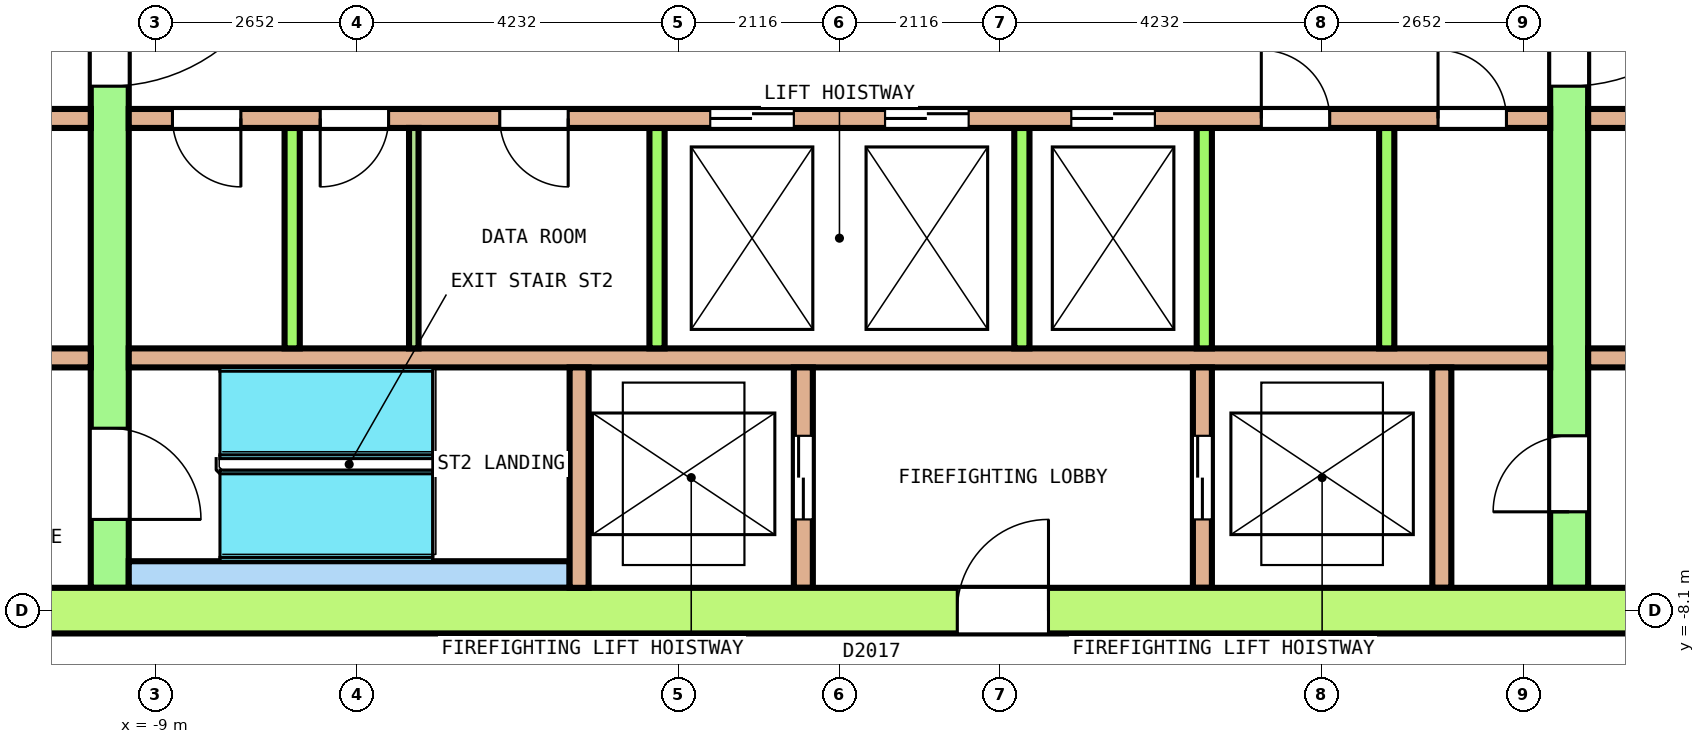
"""IFC4 building model, lengths in metres.
Left out: names, types, materials, properties, quantities, classifications, styles, units other than length and angle.
Written with IfcOpenShell. Run it as: python <this file> out.ifc"""

import sys

from ifc_helpers import new_model, si_unit, direction, frame, frame_2d, origin, place, context, subcontext, project, spatial, rectangle, extrude, element, fill, save


model = new_model("IFC4")
c1 = context("Model", 3, precision=1e-05, world=origin(), true_north=direction((0.0, 1.0)))
c2 = subcontext(c1, "Body", "Model", "MODEL_VIEW")
j1 = project(units=[si_unit("LENGTHUNIT", "METRE"), si_unit("PLANEANGLEUNIT", "RADIAN")], contexts=[c1])
p1 = place(None, origin())
s1 = spatial("IfcSite", under=j1, at=p1, CompositionType="ELEMENT")
p2 = place(p1, origin())
s2 = spatial("IfcBuilding", under=s1, at=p2, CompositionType="ELEMENT")
p3 = place(p2, frame((0.0, 0.0, 237.4)))
s3 = spatial("IfcBuildingStorey", under=s2, at=p3, CompositionType="ELEMENT", Elevation=237.4)
p4 = place(p3, frame((-13.5, -8.1, 0.0), z_axis=(0.0, 0.0, 1.0), x_axis=(1.0, 0.0, 0.0)))
e1 = element("IfcWall", 1, at=p4, inside=s3, PredefinedType="SHEAR", context=c2, shape_type="SweptSolid", body=[
    extrude(rectangle(XDim=27.0, YDim=0.6, at=frame_2d((13.5, 0.0))), origin(), (0.0, 0.0, 1.0), 3.7),
])
p5 = place(p4, frame((15.05, 0.0, 0.0)))
e2 = element("IfcOpeningElement", 2, at=p5, cuts=e1, PredefinedType="OPENING", context=c2, shape_type="SweptSolid", body=[
    extrude(rectangle(XDim=1.2, YDim=2.1, at=frame_2d((0.6, 1.05))), frame((0.0, 0.31, 0.0), z_axis=(0.0, -1.0, 0.0), x_axis=(1.0, 0.0, 0.0)), (0.0, 0.0, 1.0), 0.62),
])
p6 = place(p3, frame((-9.6, -7.8, 0.0), z_axis=(0.0, 0.0, 1.0), x_axis=(0.0, 1.0, 0.0)))
e3 = element("IfcWall", 3, at=p6, inside=s3, PredefinedType="SHEAR", context=c2, shape_type="SweptSolid", body=[
    extrude(rectangle(XDim=15.6, YDim=0.5, at=frame_2d((7.8, 0.0))), origin(), (0.0, 0.0, 1.0), 3.7),
])
p7 = place(p6, frame((6.6, 0.0, 0.0)))
e4 = element("IfcOpeningElement", 4, at=p7, cuts=e3, PredefinedType="OPENING", context=c2, shape_type="SweptSolid", body=[
    extrude(rectangle(XDim=2.4, YDim=2.1, at=frame_2d((1.2, 1.05))), frame((0.0, 0.26, 0.0), z_axis=(0.0, -1.0, 0.0), x_axis=(1.0, 0.0, 0.0)), (0.0, 0.0, 1.0), 0.52),
])
p8 = place(p6, frame((13.5, 0.0, 0.0)))
e5 = element("IfcOpeningElement", 5, at=p8, cuts=e3, PredefinedType="OPENING", context=c2, shape_type="SweptSolid", body=[
    extrude(rectangle(XDim=1.2, YDim=2.1, at=frame_2d((0.6, 1.05))), frame((0.0, 0.26, 0.0), z_axis=(0.0, -1.0, 0.0), x_axis=(1.0, 0.0, 0.0)), (0.0, 0.0, 1.0), 0.52),
])
p9 = place(p6, frame((0.9, 0.0, 0.0)))
e6 = element("IfcOpeningElement", 6, at=p9, cuts=e3, PredefinedType="OPENING", context=c2, shape_type="SweptSolid", body=[
    extrude(rectangle(XDim=1.2, YDim=2.1, at=frame_2d((0.6, 1.05))), frame((0.0, 0.26, 0.0), z_axis=(0.0, -1.0, 0.0), x_axis=(1.0, 0.0, 0.0)), (0.0, 0.0, 1.0), 0.52),
])
p10 = place(p3, frame((9.6, -7.8, 0.0), z_axis=(0.0, 0.0, 1.0), x_axis=(0.0, 1.0, 0.0)))
e7 = element("IfcWall", 7, at=p10, inside=s3, PredefinedType="SHEAR", context=c2, shape_type="SweptSolid", body=[
    extrude(rectangle(XDim=15.6, YDim=0.5, at=frame_2d((7.8, 0.0))), origin(), (0.0, 0.0, 1.0), 3.7),
])
p11 = place(p10, frame((6.6, 0.0, 0.0)))
e8 = element("IfcOpeningElement", 8, at=p11, cuts=e7, PredefinedType="OPENING", context=c2, shape_type="SweptSolid", body=[
    extrude(rectangle(XDim=2.4, YDim=2.1, at=frame_2d((1.2, 1.05))), frame((0.0, 0.26, 0.0), z_axis=(0.0, -1.0, 0.0), x_axis=(1.0, 0.0, 0.0)), (0.0, 0.0, 1.0), 0.52),
])
p12 = place(p10, frame((13.5, 0.0, 0.0)))
e9 = element("IfcOpeningElement", 9, at=p12, cuts=e7, PredefinedType="OPENING", context=c2, shape_type="SweptSolid", body=[
    extrude(rectangle(XDim=1.2, YDim=2.1, at=frame_2d((0.6, 1.05))), frame((0.0, 0.26, 0.0), z_axis=(0.0, -1.0, 0.0), x_axis=(1.0, 0.0, 0.0)), (0.0, 0.0, 1.0), 0.52),
])
p13 = place(p10, frame((1.0, 0.0, 0.0)))
e10 = element("IfcOpeningElement", 10, at=p13, cuts=e7, PredefinedType="OPENING", context=c2, shape_type="SweptSolid", body=[
    extrude(rectangle(XDim=1.0, YDim=2.1, at=frame_2d((0.5, 1.05))), frame((0.0, 0.26, 0.0), z_axis=(0.0, -1.0, 0.0), x_axis=(1.0, 0.0, 0.0)), (0.0, 0.0, 1.0), 0.52),
])
p14 = place(p3, frame((-12.9, -1.625, 0.0), z_axis=(0.0, 0.0, 1.0), x_axis=(1.0, 0.0, 0.0)))
e11 = element("IfcWall", 11, at=p14, inside=s3, PredefinedType="SOLIDWALL", context=c2, shape_type="SweptSolid", body=[
    extrude(rectangle(XDim=3.05, YDim=0.25, at=frame_2d((1.525, 0.0))), origin(), (0.0, 0.0, 1.0), 3.7),
])
p15 = place(p14, frame((1.075, 0.0, 0.0)))
e12 = element("IfcOpeningElement", 12, at=p15, cuts=e11, PredefinedType="OPENING", context=c2, shape_type="SweptSolid", body=[
    extrude(rectangle(XDim=0.9, YDim=2.1, at=frame_2d((0.45, 1.05))), frame((0.0, 0.135, 0.0), z_axis=(0.0, -1.0, 0.0), x_axis=(1.0, 0.0, 0.0)), (0.0, 0.0, 1.0), 0.27),
])
p16 = place(p3, frame((-9.35, -1.625, 0.0), z_axis=(0.0, 0.0, 1.0), x_axis=(1.0, 0.0, 0.0)))
e13 = element("IfcWall", 13, at=p16, inside=s3, PredefinedType="SOLIDWALL", context=c2, shape_type="SweptSolid", body=[
    extrude(rectangle(XDim=18.7, YDim=0.25, at=frame_2d((9.35, 0.0))), origin(), (0.0, 0.0, 1.0), 3.7),
])
p17 = place(p16, frame((7.65, 0.0, 0.0)))
e14 = element("IfcOpeningElement", 14, at=p17, cuts=e13, PredefinedType="OPENING", context=c2, shape_type="SweptSolid", body=[
    extrude(rectangle(XDim=1.1, YDim=2.1, at=frame_2d((0.55, 1.05))), frame((0.0, 0.135, 0.0), z_axis=(0.0, -1.0, 0.0), x_axis=(1.0, 0.0, 0.0)), (0.0, 0.0, 1.0), 0.27),
])
p18 = place(p16, frame((9.95, 0.0, 0.0)))
e15 = element("IfcOpeningElement", 15, at=p18, cuts=e13, PredefinedType="OPENING", context=c2, shape_type="SweptSolid", body=[
    extrude(rectangle(XDim=1.1, YDim=2.1, at=frame_2d((0.55, 1.05))), frame((0.0, 0.135, 0.0), z_axis=(0.0, -1.0, 0.0), x_axis=(1.0, 0.0, 0.0)), (0.0, 0.0, 1.0), 0.27),
])
p19 = place(p16, frame((12.4, 0.0, 0.0)))
e16 = element("IfcOpeningElement", 16, at=p19, cuts=e13, PredefinedType="OPENING", context=c2, shape_type="SweptSolid", body=[
    extrude(rectangle(XDim=1.1, YDim=2.1, at=frame_2d((0.55, 1.05))), frame((0.0, 0.135, 0.0), z_axis=(0.0, -1.0, 0.0), x_axis=(1.0, 0.0, 0.0)), (0.0, 0.0, 1.0), 0.27),
])
p20 = place(p16, frame((0.575, 0.0, 0.0)))
e17 = element("IfcOpeningElement", 17, at=p20, cuts=e13, PredefinedType="OPENING", context=c2, shape_type="SweptSolid", body=[
    extrude(rectangle(XDim=0.9, YDim=2.1, at=frame_2d((0.45, 1.05))), frame((0.0, 0.135, 0.0), z_axis=(0.0, -1.0, 0.0), x_axis=(1.0, 0.0, 0.0)), (0.0, 0.0, 1.0), 0.27),
])
p21 = place(p16, frame((2.519, 0.0, 0.0)))
e18 = element("IfcOpeningElement", 18, at=p21, cuts=e13, PredefinedType="OPENING", context=c2, shape_type="SweptSolid", body=[
    extrude(rectangle(XDim=0.9, YDim=2.1, at=frame_2d((0.45, 1.05))), frame((0.0, 0.135, 0.0), z_axis=(0.0, -1.0, 0.0), x_axis=(1.0, 0.0, 0.0)), (0.0, 0.0, 1.0), 0.27),
])
p22 = place(p16, frame((4.881, 0.0, 0.0)))
e19 = element("IfcOpeningElement", 19, at=p22, cuts=e13, PredefinedType="OPENING", context=c2, shape_type="SweptSolid", body=[
    extrude(rectangle(XDim=0.9, YDim=2.1, at=frame_2d((0.45, 1.05))), frame((0.0, 0.135, 0.0), z_axis=(0.0, -1.0, 0.0), x_axis=(1.0, 0.0, 0.0)), (0.0, 0.0, 1.0), 0.27),
])
p23 = place(p16, frame((14.9, 0.0, 0.0)))
e20 = element("IfcOpeningElement", 20, at=p23, cuts=e13, PredefinedType="OPENING", context=c2, shape_type="SweptSolid", body=[
    extrude(rectangle(XDim=0.9, YDim=2.1, at=frame_2d((0.45, 1.05))), frame((0.0, 0.135, 0.0), z_axis=(0.0, -1.0, 0.0), x_axis=(1.0, 0.0, 0.0)), (0.0, 0.0, 1.0), 0.27),
])
p24 = place(p16, frame((17.225, 0.0, 0.0)))
e21 = element("IfcOpeningElement", 21, at=p24, cuts=e13, PredefinedType="OPENING", context=c2, shape_type="SweptSolid", body=[
    extrude(rectangle(XDim=0.9, YDim=2.1, at=frame_2d((0.45, 1.05))), frame((0.0, 0.135, 0.0), z_axis=(0.0, -1.0, 0.0), x_axis=(1.0, 0.0, 0.0)), (0.0, 0.0, 1.0), 0.27),
])
p25 = place(p3, frame((9.85, -1.625, 0.0), z_axis=(0.0, 0.0, 1.0), x_axis=(1.0, 0.0, 0.0)))
e22 = element("IfcWall", 22, at=p25, inside=s3, PredefinedType="SOLIDWALL", context=c2, shape_type="SweptSolid", body=[
    extrude(rectangle(XDim=3.05, YDim=0.25, at=frame_2d((1.525, 0.0))), origin(), (0.0, 0.0, 1.0), 3.7),
])
p26 = place(p25, frame((1.075, 0.0, 0.0)))
e23 = element("IfcOpeningElement", 23, at=p26, cuts=e22, PredefinedType="OPENING", context=c2, shape_type="SweptSolid", body=[
    extrude(rectangle(XDim=0.9, YDim=2.1, at=frame_2d((0.45, 1.05))), frame((0.0, 0.135, 0.0), z_axis=(0.0, -1.0, 0.0), x_axis=(1.0, 0.0, 0.0)), (0.0, 0.0, 1.0), 0.27),
])
p27 = place(p3, frame((-12.9, -4.775, 0.0), z_axis=(0.0, 0.0, 1.0), x_axis=(1.0, 0.0, 0.0)))
e24 = element("IfcWall", 24, at=p27, inside=s3, PredefinedType="SOLIDWALL", context=c2, shape_type="SweptSolid", body=[
    extrude(rectangle(XDim=3.05, YDim=0.25, at=frame_2d((1.525, 0.0))), origin(), (0.0, 0.0, 1.0), 3.7),
])
p28 = place(p3, frame((-9.35, -4.775, 0.0), z_axis=(0.0, 0.0, 1.0), x_axis=(1.0, 0.0, 0.0)))
e25 = element("IfcWall", 25, at=p28, inside=s3, PredefinedType="SOLIDWALL", context=c2, shape_type="SweptSolid", body=[
    extrude(rectangle(XDim=18.7, YDim=0.25, at=frame_2d((9.35, 0.0))), origin(), (0.0, 0.0, 1.0), 3.7),
])
p29 = place(p3, frame((9.85, -4.775, 0.0), z_axis=(0.0, 0.0, 1.0), x_axis=(1.0, 0.0, 0.0)))
e26 = element("IfcWall", 26, at=p29, inside=s3, PredefinedType="SOLIDWALL", context=c2, shape_type="SweptSolid", body=[
    extrude(rectangle(XDim=3.05, YDim=0.25, at=frame_2d((1.525, 0.0))), origin(), (0.0, 0.0, 1.0), 3.7),
])
for number, where, z_axis, x_axis in (
    (27, (-7.2, -4.65, 0.0), (0.0, 0.0, 1.0), (0.0, 1.0, 0.0)),
    (28, (-2.4, -4.65, 0.0), (0.0, 0.0, 1.0), (0.0, 1.0, 0.0)),
    (29, (2.4, -4.65, 0.0), (0.0, 0.0, 1.0), (0.0, 1.0, 0.0)),
    (30, (4.8, -4.65, 0.0), (0.0, 0.0, 1.0), (0.0, 1.0, 0.0)),
    (31, (7.2, -4.65, 0.0), (0.0, 0.0, 1.0), (0.0, 1.0, 0.0)),
):
    element("IfcWall", number, at=place(p3, frame(where, z_axis=z_axis, x_axis=x_axis)), inside=s3, PredefinedType="SOLIDWALL", context=c2, shape_type="SweptSolid", body=[
        extrude(rectangle(XDim=2.9, YDim=0.2, at=frame_2d((1.45, 0.0))), origin(), (0.0, 0.0, 1.0), 3.7),
    ])
p30 = place(p3, frame((-9.35, -7.625, 0.0), z_axis=(0.0, 0.0, 1.0), x_axis=(1.0, 0.0, 0.0)))
e32 = element("IfcWall", 32, at=p30, inside=s3, PredefinedType="SOLIDWALL", context=c2, shape_type="SweptSolid", body=[
    extrude(rectangle(XDim=5.8, YDim=0.35, at=frame_2d((2.9, 0.0))), origin(), (0.0, 0.0, 1.0), 3.7),
])
p31 = place(p3, frame((-3.425, -7.8, 0.0), z_axis=(0.0, 0.0, 1.0), x_axis=(0.0, 1.0, 0.0)))
e33 = element("IfcWall", 33, at=p31, inside=s3, PredefinedType="SOLIDWALL", context=c2, shape_type="SweptSolid", body=[
    extrude(rectangle(XDim=2.9, YDim=0.25, at=frame_2d((1.45, 0.0))), origin(), (0.0, 0.0, 1.0), 3.7),
])
p32 = place(p3, frame((-0.475, -7.8, 0.0), z_axis=(0.0, 0.0, 1.0), x_axis=(0.0, 1.0, 0.0)))
e34 = element("IfcWall", 34, at=p32, inside=s3, PredefinedType="SOLIDWALL", context=c2, shape_type="SweptSolid", body=[
    extrude(rectangle(XDim=2.9, YDim=0.25, at=frame_2d((1.45, 0.0))), origin(), (0.0, 0.0, 1.0), 3.7),
])
p33 = place(p32, frame((0.9, 0.0, 0.0)))
e35 = element("IfcOpeningElement", 35, at=p33, cuts=e34, PredefinedType="OPENING", context=c2, shape_type="SweptSolid", body=[
    extrude(rectangle(XDim=1.1, YDim=2.1, at=frame_2d((0.55, 1.05))), frame((0.0, 0.135, 0.0), z_axis=(0.0, -1.0, 0.0), x_axis=(1.0, 0.0, 0.0)), (0.0, 0.0, 1.0), 0.27),
])
p34 = place(p3, frame((4.775, -7.8, 0.0), z_axis=(0.0, 0.0, 1.0), x_axis=(0.0, 1.0, 0.0)))
e36 = element("IfcWall", 36, at=p34, inside=s3, PredefinedType="SOLIDWALL", context=c2, shape_type="SweptSolid", body=[
    extrude(rectangle(XDim=2.9, YDim=0.25, at=frame_2d((1.45, 0.0))), origin(), (0.0, 0.0, 1.0), 3.7),
])
p35 = place(p34, frame((0.9, 0.0, 0.0)))
e37 = element("IfcOpeningElement", 37, at=p35, cuts=e36, PredefinedType="OPENING", context=c2, shape_type="SweptSolid", body=[
    extrude(rectangle(XDim=1.1, YDim=2.1, at=frame_2d((0.55, 1.05))), frame((0.0, 0.135, 0.0), z_axis=(0.0, -1.0, 0.0), x_axis=(1.0, 0.0, 0.0)), (0.0, 0.0, 1.0), 0.27),
])
p36 = place(p3, frame((7.925, -7.8, 0.0), z_axis=(0.0, 0.0, 1.0), x_axis=(0.0, 1.0, 0.0)))
e38 = element("IfcWall", 38, at=p36, inside=s3, PredefinedType="SOLIDWALL", context=c2, shape_type="SweptSolid", body=[
    extrude(rectangle(XDim=2.9, YDim=0.25, at=frame_2d((1.45, 0.0))), origin(), (0.0, 0.0, 1.0), 3.7),
])
p37 = place(p3, frame((-5.6, -4.65, 0.0), z_axis=(0.0, 0.0, 1.0), x_axis=(0.0, 1.0, 0.0)))
e39 = element("IfcWall", 39, at=p37, inside=s3, PredefinedType="PARTITIONING", context=c2, shape_type="SweptSolid", body=[
    extrude(rectangle(XDim=2.9, YDim=0.125, at=frame_2d((1.45, 0.0))), origin(), (0.0, 0.0, 1.0), 3.7),
])
p38 = place(p17, origin())
e40 = element("IfcDoor", 40, at=p38, inside=s3, OperationType="DOUBLE_DOOR_SLIDING", PredefinedType="DOOR", context=c2, shape_type="SweptSolid", body=[
    extrude(rectangle(XDim=1.1, YDim=2.1, at=frame_2d((0.55, 1.05))), frame((0.0, 0.075, 0.0), z_axis=(0.0, -1.0, 0.0), x_axis=(1.0, 0.0, 0.0)), (0.0, 0.0, 1.0), 0.15),
])
fill(e14, e40)
p39 = place(p18, origin())
e41 = element("IfcDoor", 41, at=p39, inside=s3, OperationType="DOUBLE_DOOR_SLIDING", PredefinedType="DOOR", context=c2, shape_type="SweptSolid", body=[
    extrude(rectangle(XDim=1.1, YDim=2.1, at=frame_2d((0.55, 1.05))), frame((0.0, 0.075, 0.0), z_axis=(0.0, -1.0, 0.0), x_axis=(1.0, 0.0, 0.0)), (0.0, 0.0, 1.0), 0.15),
])
fill(e15, e41)
p40 = place(p19, origin())
e42 = element("IfcDoor", 42, at=p40, inside=s3, OperationType="DOUBLE_DOOR_SLIDING", PredefinedType="DOOR", context=c2, shape_type="SweptSolid", body=[
    extrude(rectangle(XDim=1.1, YDim=2.1, at=frame_2d((0.55, 1.05))), frame((0.0, 0.075, 0.0), z_axis=(0.0, -1.0, 0.0), x_axis=(1.0, 0.0, 0.0)), (0.0, 0.0, 1.0), 0.15),
])
fill(e16, e42)
p41 = place(p33, origin())
e43 = element("IfcDoor", 43, at=p41, inside=s3, OperationType="DOUBLE_DOOR_SLIDING", PredefinedType="DOOR", context=c2, shape_type="SweptSolid", body=[
    extrude(rectangle(XDim=1.1, YDim=2.1, at=frame_2d((0.55, 1.05))), frame((0.0, 0.075, 0.0), z_axis=(0.0, -1.0, 0.0), x_axis=(1.0, 0.0, 0.0)), (0.0, 0.0, 1.0), 0.15),
])
fill(e35, e43)
p42 = place(p35, origin())
e44 = element("IfcDoor", 44, at=p42, inside=s3, OperationType="DOUBLE_DOOR_SLIDING", PredefinedType="DOOR", context=c2, shape_type="SweptSolid", body=[
    extrude(rectangle(XDim=1.1, YDim=2.1, at=frame_2d((0.55, 1.05))), frame((0.0, 0.075, 0.0), z_axis=(0.0, -1.0, 0.0), x_axis=(1.0, 0.0, 0.0)), (0.0, 0.0, 1.0), 0.15),
])
fill(e37, e44)
p43 = place(p7, origin())
e45 = element("IfcDoor", 45, at=p43, inside=s3, OperationType="DOUBLE_DOOR_SINGLE_SWING", PredefinedType="DOOR", context=c2, shape_type="SweptSolid", body=[
    extrude(rectangle(XDim=2.4, YDim=2.1, at=frame_2d((1.2, 1.05))), frame((0.0, 0.2, 0.0), z_axis=(0.0, -1.0, 0.0), x_axis=(1.0, 0.0, 0.0)), (0.0, 0.0, 1.0), 0.4),
])
fill(e4, e45)
p44 = place(p11, origin())
e46 = element("IfcDoor", 46, at=p44, inside=s3, OperationType="DOUBLE_DOOR_SINGLE_SWING", PredefinedType="DOOR", context=c2, shape_type="SweptSolid", body=[
    extrude(rectangle(XDim=2.4, YDim=2.1, at=frame_2d((1.2, 1.05))), frame((0.0, 0.2, 0.0), z_axis=(0.0, -1.0, 0.0), x_axis=(1.0, 0.0, 0.0)), (0.0, 0.0, 1.0), 0.4),
])
fill(e8, e46)
p45 = place(p9, origin())
e47 = element("IfcDoor", 47, at=p45, inside=s3, OperationType="SINGLE_SWING_RIGHT", PredefinedType="DOOR", context=c2, shape_type="SweptSolid", body=[
    extrude(rectangle(XDim=1.2, YDim=2.1, at=frame_2d((0.6, 1.05))), frame((0.0, 0.2, 0.0), z_axis=(0.0, -1.0, 0.0), x_axis=(1.0, 0.0, 0.0)), (0.0, 0.0, 1.0), 0.4),
])
fill(e6, e47)
p46 = place(p5, origin())
e48 = element("IfcDoor", 48, at=p46, inside=s3, OperationType="SINGLE_SWING_RIGHT", PredefinedType="DOOR", context=c2, shape_type="SweptSolid", body=[
    extrude(rectangle(XDim=1.2, YDim=2.1, at=frame_2d((0.6, 1.05))), frame((0.0, 0.25, 0.0), z_axis=(0.0, -1.0, 0.0), x_axis=(1.0, 0.0, 0.0)), (0.0, 0.0, 1.0), 0.5),
])
fill(e2, e48)
p47 = place(p13, origin())
e49 = element("IfcDoor", 49, at=p47, inside=s3, OperationType="SINGLE_SWING_RIGHT", PredefinedType="DOOR", context=c2, shape_type="SweptSolid", body=[
    extrude(rectangle(XDim=1.0, YDim=2.1, at=frame_2d((0.5, 1.05))), frame((0.0, 0.2, 0.0), z_axis=(0.0, -1.0, 0.0), x_axis=(1.0, 0.0, 0.0)), (0.0, 0.0, 1.0), 0.4),
])
fill(e10, e49)
p48 = place(p20, origin())
e50 = element("IfcDoor", 50, at=p48, inside=s3, OperationType="SINGLE_SWING_RIGHT", PredefinedType="DOOR", context=c2, shape_type="SweptSolid", body=[
    extrude(rectangle(XDim=0.9, YDim=2.1, at=frame_2d((0.45, 1.05))), frame((0.0, 0.075, 0.0), z_axis=(0.0, -1.0, 0.0), x_axis=(1.0, 0.0, 0.0)), (0.0, 0.0, 1.0), 0.15),
])
fill(e17, e50)
p49 = place(p21, origin())
e51 = element("IfcDoor", 51, at=p49, inside=s3, OperationType="SINGLE_SWING_LEFT", PredefinedType="DOOR", context=c2, shape_type="SweptSolid", body=[
    extrude(rectangle(XDim=0.9, YDim=2.1, at=frame_2d((0.45, 1.05))), frame((0.0, 0.075, 0.0), z_axis=(0.0, -1.0, 0.0), x_axis=(1.0, 0.0, 0.0)), (0.0, 0.0, 1.0), 0.15),
])
fill(e18, e51)
p50 = place(p22, origin())
e52 = element("IfcDoor", 52, at=p50, inside=s3, OperationType="SINGLE_SWING_RIGHT", PredefinedType="DOOR", context=c2, shape_type="SweptSolid", body=[
    extrude(rectangle(XDim=0.9, YDim=2.1, at=frame_2d((0.45, 1.05))), frame((0.0, 0.075, 0.0), z_axis=(0.0, -1.0, 0.0), x_axis=(1.0, 0.0, 0.0)), (0.0, 0.0, 1.0), 0.15),
])
fill(e19, e52)
p51 = place(p23, origin())
e53 = element("IfcDoor", 53, at=p51, inside=s3, OperationType="SINGLE_SWING_LEFT", PredefinedType="DOOR", context=c2, shape_type="SweptSolid", body=[
    extrude(rectangle(XDim=0.9, YDim=2.1, at=frame_2d((0.45, 1.05))), frame((0.0, 0.075, 0.0), z_axis=(0.0, -1.0, 0.0), x_axis=(1.0, 0.0, 0.0)), (0.0, 0.0, 1.0), 0.15),
])
fill(e20, e53)
p52 = place(p24, origin())
e54 = element("IfcDoor", 54, at=p52, inside=s3, OperationType="SINGLE_SWING_RIGHT", PredefinedType="DOOR", context=c2, shape_type="SweptSolid", body=[
    extrude(rectangle(XDim=0.9, YDim=2.1, at=frame_2d((0.45, 1.05))), frame((0.0, 0.075, 0.0), z_axis=(0.0, -1.0, 0.0), x_axis=(1.0, 0.0, 0.0)), (0.0, 0.0, 1.0), 0.15),
])
fill(e21, e54)
save(model, sys.argv[1])
